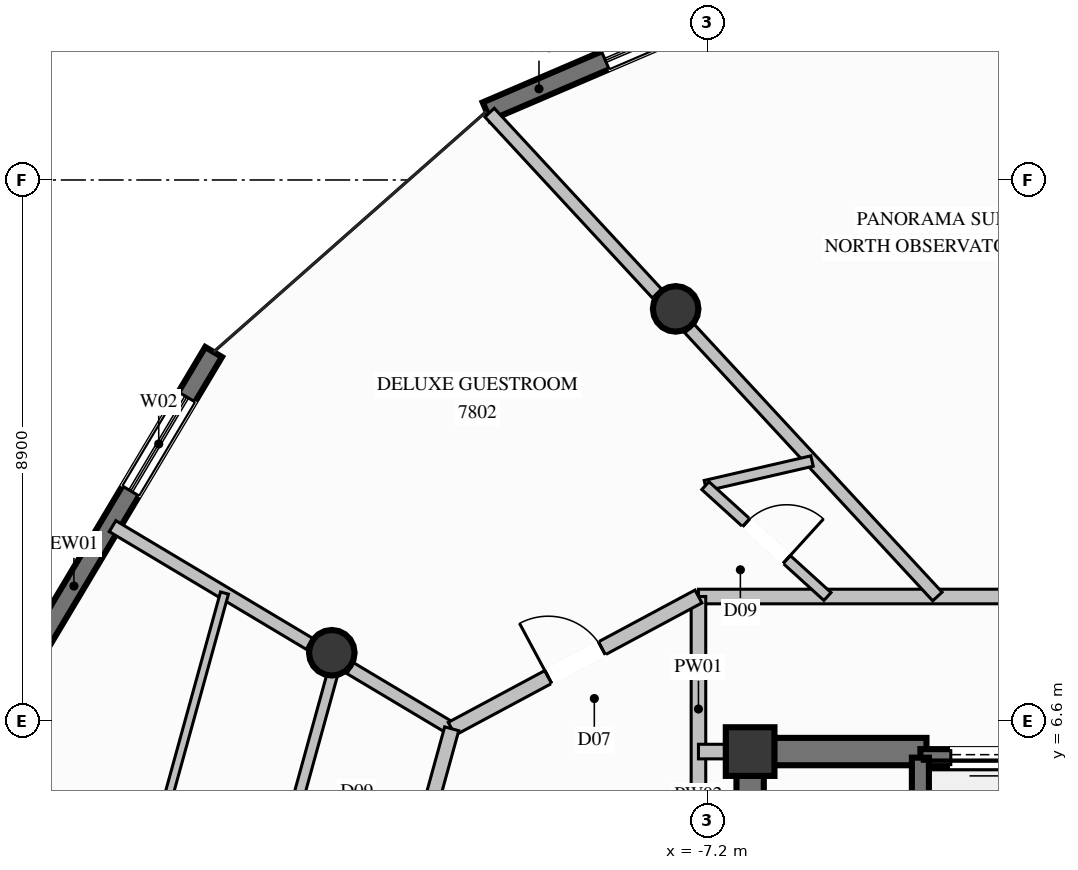
"""IFC4 building model, lengths in metres.
Left out: names, types, materials, properties, quantities, classifications, styles, units other than length and angle.
Written with IfcOpenShell. Run it as: python <this file> out.ifc"""

import sys

from ifc_helpers import new_model, si_unit, direction, frame, frame_2d, origin, origin_2d, place, context, subcontext, project, spatial, rectangle, circle, extrude, element, fill, save


model = new_model("IFC4")
c1 = context("Model", 3, precision=1e-05, world=origin(), true_north=direction((0.0, 1.0)))
c2 = subcontext(c1, "Body", "Model", "MODEL_VIEW")
j1 = project(units=[si_unit("LENGTHUNIT", "METRE"), si_unit("PLANEANGLEUNIT", "RADIAN")], contexts=[c1])
p1 = place(None, origin())
s1 = spatial("IfcSite", under=j1, at=p1, CompositionType="ELEMENT")
p2 = place(p1, origin())
s2 = spatial("IfcBuilding", under=s1, at=p2, CompositionType="ELEMENT")
p3 = place(p2, frame((0.0, 0.0, 293.4)))
s3 = spatial("IfcBuildingStorey", under=s2, at=p3, CompositionType="ELEMENT", Elevation=293.4)
p4 = place(p3, frame((-6.5, 6.1, 0.0), z_axis=(0.0, 0.0, 1.0), x_axis=(1.0, 0.0, 0.0)))
e1 = element("IfcColumn", 1, at=p4, inside=s3, PredefinedType="COLUMN", context=c2, shape_type="SweptSolid", body=[
    extrude(rectangle(XDim=0.8, YDim=0.8, at=origin_2d()), origin(), (0.0, 0.0, 1.0), 3.8),
])
p5 = place(p3, frame((-6.275, 6.1, 0.0), z_axis=(0.0, 0.0, 1.0), x_axis=(1.0, 0.0, 0.0)))
e2 = element("IfcWall", 2, at=p5, inside=s3, PredefinedType="SHEAR", context=c2, shape_type="SweptSolid", body=[
    extrude(rectangle(XDim=2.675, YDim=0.45, at=frame_2d((1.337, 0.0))), origin(), (0.0, 0.0, 1.0), 3.8),
])
p6 = place(p3, frame((-6.5, 2.35, 0.0), z_axis=(0.0, 0.0, 1.0), x_axis=(0.0, 1.0, 0.0)))
e3 = element("IfcWall", 3, at=p6, inside=s3, PredefinedType="SHEAR", context=c2, shape_type="SweptSolid", body=[
    extrude(rectangle(XDim=3.975, YDim=0.45, at=frame_2d((1.987, 0.0))), origin(), (0.0, 0.0, 1.0), 3.8),
])
for number, where, z_axis, x_axis in (
    (4, (-7.725, 13.38, 0.0), (0.0, 0.0, 1.0), (1.0, 0.0, 0.0)),
    (5, (-13.38, 7.725, 0.0), (0.0, 0.0, 1.0), (1.0, 0.0, 0.0)),
):
    element("IfcColumn", number, at=place(p3, frame(where, z_axis=z_axis, x_axis=x_axis)), inside=s3, PredefinedType="COLUMN", context=c2, shape_type="SweptSolid", body=[
        extrude(circle(Radius=0.375, at=origin_2d()), origin(), (0.0, 0.0, 1.0), 3.8),
    ])
p7 = place(p3, frame((-10.835, 16.629, 0.0), z_axis=(0.0, 0.0, 1.0), x_axis=(0.919149299583, 0.393909336112, 0.0)))
e6 = element("IfcWall", 6, at=p7, inside=s3, PredefinedType="SOLIDWALL", context=c2, shape_type="SweptSolid", body=[
    extrude(rectangle(XDim=5.915, YDim=0.32, at=frame_2d((2.958, 0.0))), origin(), (0.0, 0.0, 1.0), 3.57),
])
p8 = place(p7, frame((2.126, 0.0, 0.35)))
e7 = element("IfcOpeningElement", 7, at=p8, cuts=e6, PredefinedType="OPENING", context=c2, shape_type="SweptSolid", body=[
    extrude(rectangle(XDim=1.8, YDim=2.6, at=frame_2d((0.9, 1.3))), frame((0.0, 0.17, 0.0), z_axis=(0.0, -1.0, 0.0), x_axis=(1.0, 0.0, 0.0)), (0.0, 0.0, 1.0), 0.34),
])
p9 = place(p3, frame((-18.426, 7.473, 0.0), z_axis=(0.0, 0.0, 1.0), x_axis=(0.512459907896, 0.858711152134, 0.0)))
e8 = element("IfcWall", 8, at=p9, inside=s3, PredefinedType="SOLIDWALL", context=c2, shape_type="SweptSolid", body=[
    extrude(rectangle(XDim=6.053, YDim=0.32, at=frame_2d((3.027, 0.0))), origin(), (0.0, 0.0, 1.0), 3.57),
])
p10 = place(p9, frame((3.392, 0.0, 0.35)))
e9 = element("IfcOpeningElement", 9, at=p10, cuts=e8, PredefinedType="OPENING", context=c2, shape_type="SweptSolid", body=[
    extrude(rectangle(XDim=1.8, YDim=2.6, at=frame_2d((0.9, 1.3))), frame((0.0, 0.17, 0.0), z_axis=(0.0, -1.0, 0.0), x_axis=(1.0, 0.0, 0.0)), (0.0, 0.0, 1.0), 0.34),
])
p11 = place(p3, frame((-1.6, 6.0, 0.0), z_axis=(0.0, 0.0, 1.0), x_axis=(-1.0, 0.0, 0.0)))
e10 = element("IfcWall", 10, at=p11, inside=s3, PredefinedType="SOLIDWALL", context=c2, shape_type="SweptSolid", body=[
    extrude(rectangle(XDim=2.1, YDim=0.28, at=frame_2d((1.05, 0.0))), origin(), (0.0, 0.0, 1.0), 3.57),
])
p12 = place(p11, frame((0.5, 0.0, 0.0)))
e11 = element("IfcOpeningElement", 11, at=p12, cuts=e10, PredefinedType="OPENING", context=c2, shape_type="SweptSolid", body=[
    extrude(rectangle(XDim=1.1, YDim=2.2, at=frame_2d((0.55, 1.1))), frame((0.0, 0.15, 0.0), z_axis=(0.0, -1.0, 0.0), x_axis=(1.0, 0.0, 0.0)), (0.0, 0.0, 1.0), 0.3),
])
p13 = place(p3, frame((-3.7, 6.0, 0.0), z_axis=(0.0, 0.0, 1.0), x_axis=(0.0, -1.0, 0.0)))
e12 = element("IfcWall", 12, at=p13, inside=s3, PredefinedType="SOLIDWALL", context=c2, shape_type="SweptSolid", body=[
    extrude(rectangle(XDim=2.5, YDim=0.28, at=frame_2d((1.25, 0.0))), origin(), (0.0, 0.0, 1.0), 3.57),
])
p14 = place(p3, frame((-7.35, 8.65, 0.0), z_axis=(0.0, 0.0, 1.0), x_axis=(1.0, 0.0, 0.0)))
e13 = element("IfcWall", 13, at=p14, inside=s3, PredefinedType="PARTITIONING", context=c2, shape_type="SweptSolid", body=[
    extrude(rectangle(XDim=13.1, YDim=0.24, at=frame_2d((6.55, 0.0))), origin(), (0.0, 0.0, 1.0), 3.57),
])
p15 = place(p3, frame((-7.35, 4.95, 0.0), z_axis=(0.0, 0.0, 1.0), x_axis=(0.0, 1.0, 0.0)))
e14 = element("IfcWall", 14, at=p15, inside=s3, PredefinedType="PARTITIONING", context=c2, shape_type="SweptSolid", body=[
    extrude(rectangle(XDim=3.7, YDim=0.24, at=frame_2d((1.85, 0.0))), origin(), (0.0, 0.0, 1.0), 2.655),
])
p16 = place(p3, frame((-7.35, 6.1, 0.0), z_axis=(0.0, 0.0, 1.0), x_axis=(1.0, 0.0, 0.0)))
e15 = element("IfcWall", 15, at=p16, inside=s3, PredefinedType="PARTITIONING", context=c2, shape_type="SweptSolid", body=[
    extrude(rectangle(XDim=0.85, YDim=0.24, at=frame_2d((0.425, 0.0))), origin(), (0.0, 0.0, 1.0), 3.011),
])
p17 = place(p3, frame((-11.408, 6.475, 0.0), z_axis=(0.0, 0.0, 1.0), x_axis=(-0.858521768477, 0.512777118299, 0.0)))
e16 = element("IfcWall", 16, at=p17, inside=s3, PredefinedType="PARTITIONING", context=c2, shape_type="SweptSolid", body=[
    extrude(rectangle(XDim=1.944, YDim=0.21, at=frame_2d((0.972, 0.0))), origin(), (0.0, 0.0, 1.0), 3.011),
])
p18 = place(p3, frame((-13.747, 7.872, 0.0), z_axis=(0.0, 0.0, 1.0), x_axis=(-0.858496185015, 0.512819949216, 0.0)))
e17 = element("IfcWall", 17, at=p18, inside=s3, PredefinedType="PARTITIONING", context=c2, shape_type="SweptSolid", body=[
    extrude(rectangle(XDim=3.773, YDim=0.21, at=frame_2d((1.886, 0.0))), origin(), (0.0, 0.0, 1.0), 3.57),
])
p19 = place(p3, frame((-3.42, 8.65, 0.0), z_axis=(0.0, 0.0, 1.0), x_axis=(-0.679191516768, 0.733961091306, 0.0)))
e18 = element("IfcWall", 18, at=p19, inside=s3, PredefinedType="PARTITIONING", context=c2, shape_type="SweptSolid", body=[
    extrude(rectangle(XDim=6.004, YDim=0.21, at=frame_2d((3.002, 0.0))), origin(), (0.0, 0.0, 1.0), 3.57),
])
p20 = place(p3, frame((-8.03, 13.631, 0.0), z_axis=(0.0, 0.0, 1.0), x_axis=(-0.67921956095, 0.733935138839, 0.0)))
e19 = element("IfcWall", 19, at=p20, inside=s3, PredefinedType="PARTITIONING", context=c2, shape_type="SweptSolid", body=[
    extrude(rectangle(XDim=4.056, YDim=0.21, at=frame_2d((2.028, 0.0))), origin(), (0.0, 0.0, 1.0), 3.57),
])
p21 = place(p3, frame((-7.236, 10.473, 0.0), z_axis=(0.0, 0.0, 1.0), x_axis=(0.974363761538, 0.224978354961, 0.0)))
e20 = element("IfcWall", 20, at=p21, inside=s3, PredefinedType="PLUMBINGWALL", context=c2, shape_type="SweptSolid", body=[
    extrude(rectangle(XDim=1.8, YDim=0.175, at=frame_2d((0.9, 0.0))), origin(), (0.0, 0.0, 1.0), 3.57),
])
p22 = place(p3, frame((-7.236, 10.473, 0.0), z_axis=(0.0, 0.0, 1.0), x_axis=(0.740400174531, -0.672166334738, 0.0)))
e21 = element("IfcWall", 21, at=p22, inside=s3, PredefinedType="PLUMBINGWALL", context=c2, shape_type="SweptSolid", body=[
    extrude(rectangle(XDim=2.712, YDim=0.175, at=frame_2d((1.356, 0.0))), origin(), (0.0, 0.0, 1.0), 3.57),
])
p23 = place(p22, frame((0.906, 0.0, 0.0)))
e22 = element("IfcOpeningElement", 22, at=p23, cuts=e21, PredefinedType="OPENING", context=c2, shape_type="SweptSolid", body=[
    extrude(rectangle(XDim=0.9, YDim=2.1, at=frame_2d((0.45, 1.05))), frame((0.0, 0.098, 0.0), z_axis=(0.0, -1.0, 0.0), x_axis=(1.0, 0.0, 0.0)), (0.0, 0.0, 1.0), 0.195),
])
p24 = place(p3, frame((-11.408, 6.475, 0.0), z_axis=(0.0, 0.0, 1.0), x_axis=(0.881394026477, 0.472381805418, 0.0)))
e23 = element("IfcWall", 23, at=p24, inside=s3, PredefinedType="PARTITIONING", context=c2, shape_type="SweptSolid", body=[
    extrude(rectangle(XDim=4.604, YDim=0.24, at=frame_2d((2.302, 0.0))), origin(), (0.0, 0.0, 1.0), 3.57),
])
p25 = place(p24, frame((1.802, 0.0, 0.0)))
e24 = element("IfcOpeningElement", 24, at=p25, cuts=e23, PredefinedType="OPENING", context=c2, shape_type="SweptSolid", body=[
    extrude(rectangle(XDim=1.0, YDim=2.2, at=frame_2d((0.5, 1.1))), frame((0.0, 0.13, 0.0), z_axis=(0.0, -1.0, 0.0), x_axis=(1.0, 0.0, 0.0)), (0.0, 0.0, 1.0), 0.26),
])
p26 = place(p3, frame((-11.408, 6.475, 0.0), z_axis=(0.0, 0.0, 1.0), x_axis=(-0.265673419644, -0.964063086159, 0.0)))
e25 = element("IfcWall", 25, at=p26, inside=s3, PredefinedType="PARTITIONING", context=c2, shape_type="SweptSolid", body=[
    extrude(rectangle(XDim=2.755, YDim=0.24, at=frame_2d((1.377, 0.0))), origin(), (0.0, 0.0, 1.0), 3.57),
])
p27 = place(p3, frame((-13.305, 7.608, 0.0), z_axis=(0.0, 0.0, 1.0), x_axis=(-0.265680279944, -0.964061195593, 0.0)))
e26 = element("IfcWall", 26, at=p27, inside=s3, PredefinedType="PLUMBINGWALL", context=c2, shape_type="SweptSolid", body=[
    extrude(rectangle(XDim=3.271, YDim=0.175, at=frame_2d((1.636, 0.0))), origin(), (0.0, 0.0, 1.0), 3.138),
])
p28 = place(p3, frame((-15.145, 8.707, 0.0), z_axis=(0.0, 0.0, 1.0), x_axis=(-0.265780037486, -0.964033698412, 0.0)))
e27 = element("IfcWall", 27, at=p28, inside=s3, PredefinedType="PARTITIONING", context=c2, shape_type="SweptSolid", body=[
    extrude(rectangle(XDim=8.981, YDim=0.135, at=frame_2d((4.49, 0.0))), origin(), (0.0, 0.0, 1.0), 3.57),
])
p29 = place(p28, frame((4.016, 0.0, 0.0)))
e28 = element("IfcOpeningElement", 28, at=p29, cuts=e27, PredefinedType="OPENING", context=c2, shape_type="SweptSolid", body=[
    extrude(rectangle(XDim=0.95, YDim=2.1, at=frame_2d((0.475, 1.05))), frame((0.0, 0.078, 0.0), z_axis=(0.0, -1.0, 0.0), x_axis=(1.0, 0.0, 0.0)), (0.0, 0.0, 1.0), 0.155),
])
p30 = place(p8, origin())
e29 = element("IfcWindow", 29, at=p30, inside=s3, PartitioningType="SINGLE_PANEL", PredefinedType="WINDOW", context=c2, shape_type="SweptSolid", body=[
    extrude(rectangle(XDim=1.8, YDim=2.6, at=frame_2d((0.9, 1.3))), frame((0.0, 0.03, 0.0), z_axis=(0.0, -1.0, 0.0), x_axis=(1.0, 0.0, 0.0)), (0.0, 0.0, 1.0), 0.06),
])
fill(e7, e29)
p31 = place(p10, origin())
e30 = element("IfcWindow", 30, at=p31, inside=s3, PartitioningType="SINGLE_PANEL", PredefinedType="WINDOW", context=c2, shape_type="SweptSolid", body=[
    extrude(rectangle(XDim=1.8, YDim=2.6, at=frame_2d((0.9, 1.3))), frame((0.0, 0.03, 0.0), z_axis=(0.0, -1.0, 0.0), x_axis=(1.0, 0.0, 0.0)), (0.0, 0.0, 1.0), 0.06),
])
fill(e9, e30)
p32 = place(p12, origin())
e31 = element("IfcDoor", 31, at=p32, inside=s3, OperationType="SLIDING_TO_LEFT", PredefinedType="DOOR", context=c2, shape_type="SweptSolid", body=[
    extrude(rectangle(XDim=1.1, YDim=2.2, at=frame_2d((0.55, 1.1))), frame((0.0, 0.025, 0.0), z_axis=(0.0, -1.0, 0.0), x_axis=(1.0, 0.0, 0.0)), (0.0, 0.0, 1.0), 0.05),
])
fill(e11, e31)
p33 = place(p23, origin())
e32 = element("IfcDoor", 32, at=p33, inside=s3, OperationType="SINGLE_SWING_RIGHT", PredefinedType="DOOR", context=c2, shape_type="SweptSolid", body=[
    extrude(rectangle(XDim=0.9, YDim=2.1, at=frame_2d((0.45, 1.05))), frame((0.0, 0.025, 0.0), z_axis=(0.0, -1.0, 0.0), x_axis=(1.0, 0.0, 0.0)), (0.0, 0.0, 1.0), 0.05),
])
fill(e22, e32)
p34 = place(p25, origin())
e33 = element("IfcDoor", 33, at=p34, inside=s3, OperationType="SINGLE_SWING_LEFT", PredefinedType="DOOR", context=c2, shape_type="SweptSolid", body=[
    extrude(rectangle(XDim=1.0, YDim=2.2, at=frame_2d((0.5, 1.1))), frame((0.0, 0.025, 0.0), z_axis=(0.0, -1.0, 0.0), x_axis=(1.0, 0.0, 0.0)), (0.0, 0.0, 1.0), 0.05),
])
fill(e24, e33)
save(model, sys.argv[1])
